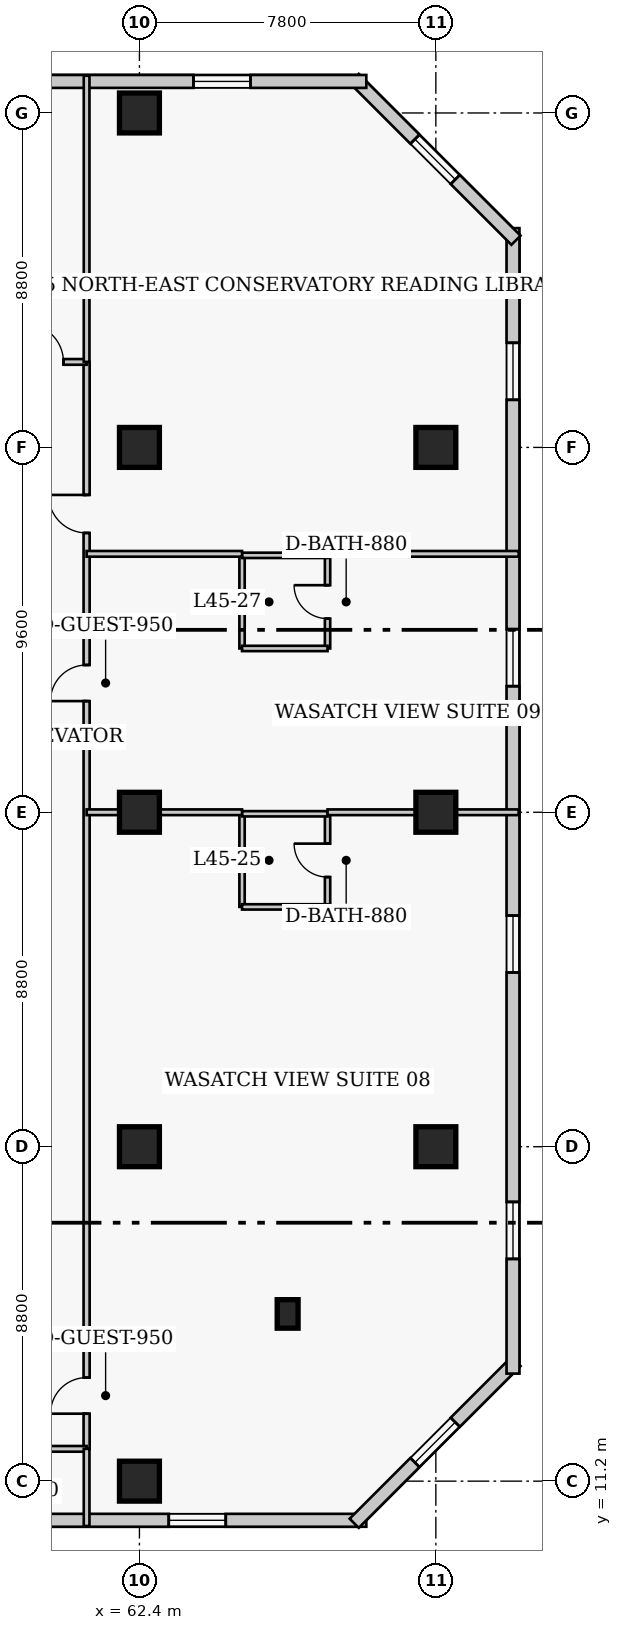
"""IFC4 building model, lengths in metres.
Left out: names, types, materials, properties, quantities, classifications, styles, units other than length and angle.
Written with IfcOpenShell. Run it as: python <this file> out.ifc"""

import sys

from ifc_helpers import new_model, si_unit, direction, frame, frame_2d, origin, origin_2d, place, context, subcontext, project, spatial, rectangle, extrude, element, fill, save


model = new_model("IFC4")
c1 = context("Model", 3, precision=1e-05, world=origin(), true_north=direction((0.0, 1.0)))
c2 = subcontext(c1, "Body", "Model", "MODEL_VIEW")
j1 = project(units=[si_unit("LENGTHUNIT", "METRE"), si_unit("PLANEANGLEUNIT", "RADIAN")], contexts=[c1])
p1 = place(None, origin())
s1 = spatial("IfcSite", under=j1, at=p1, CompositionType="ELEMENT")
p2 = place(p1, origin())
s2 = spatial("IfcBuilding", under=s1, at=p2, CompositionType="ELEMENT")
p3 = place(p2, frame((0.0, 0.0, 180.2)))
s3 = spatial("IfcBuildingStorey", under=s2, at=p3, CompositionType="ELEMENT", Elevation=180.2)
for number, where, z_axis, x_axis in (
    (1, (62.4, 11.2, 0.0), (0.0, 0.0, 1.0), (1.0, 0.0, 0.0)),
    (2, (62.4, 20.0, 0.0), (0.0, 0.0, 1.0), (1.0, 0.0, 0.0)),
    (3, (62.4, 28.8, 0.0), (0.0, 0.0, 1.0), (1.0, 0.0, 0.0)),
    (4, (62.4, 38.4, 0.0), (0.0, 0.0, 1.0), (1.0, 0.0, 0.0)),
    (5, (62.4, 47.2, 0.0), (0.0, 0.0, 1.0), (1.0, 0.0, 0.0)),
    (6, (70.2, 20.0, 0.0), (0.0, 0.0, 1.0), (1.0, 0.0, 0.0)),
    (7, (70.2, 28.8, 0.0), (0.0, 0.0, 1.0), (1.0, 0.0, 0.0)),
    (8, (70.2, 38.4, 0.0), (0.0, 0.0, 1.0), (1.0, 0.0, 0.0)),
):
    element("IfcColumn", number, at=place(p3, frame(where, z_axis=z_axis, x_axis=x_axis)), inside=s3, PredefinedType="COLUMN", context=c2, shape_type="SweptSolid", body=[
        extrude(rectangle(XDim=1.05, YDim=1.05, at=origin_2d()), origin(), (0.0, 0.0, 1.0), 3.8),
    ])
p4 = place(p3, frame((66.3, 15.6, 0.0), z_axis=(0.0, 0.0, 1.0), x_axis=(1.0, 0.0, 0.0)))
e9 = element("IfcColumn", 9, at=p4, inside=s3, PredefinedType="PILASTER", context=c2, shape_type="SweptSolid", body=[
    extrude(rectangle(XDim=0.55, YDim=0.75, at=origin_2d()), origin(), (0.0, 0.0, 1.0), 3.8),
])
p5 = place(p3, frame((41.68, 10.17, 0.0), z_axis=(0.0, 0.0, 1.0), x_axis=(1.0, 0.0, 0.0)))
e10 = element("IfcWall", 10, at=p5, inside=s3, PredefinedType="SOLIDWALL", context=c2, shape_type="SweptSolid", body=[
    extrude(rectangle(XDim=26.69, YDim=0.34, at=frame_2d((13.345, 0.0))), origin(), (0.0, 0.0, 1.0), 3.42),
])
p6 = place(p5, frame((2.548, 0.0, 0.85)))
e11 = element("IfcOpeningElement", 11, at=p6, cuts=e10, PredefinedType="OPENING", context=c2, shape_type="SweptSolid", body=[
    extrude(rectangle(XDim=1.5, YDim=1.75, at=frame_2d((0.75, 0.875))), frame((0.0, 0.18, 0.0), z_axis=(0.0, -1.0, 0.0), x_axis=(1.0, 0.0, 0.0)), (0.0, 0.0, 1.0), 0.36),
])
p7 = place(p5, frame((13.745, 0.0, 0.85)))
e12 = element("IfcOpeningElement", 12, at=p7, cuts=e10, PredefinedType="OPENING", context=c2, shape_type="SweptSolid", body=[
    extrude(rectangle(XDim=1.5, YDim=1.75, at=frame_2d((0.75, 0.875))), frame((0.0, 0.18, 0.0), z_axis=(0.0, -1.0, 0.0), x_axis=(1.0, 0.0, 0.0)), (0.0, 0.0, 1.0), 0.36),
])
p8 = place(p5, frame((21.492, 0.0, 0.85)))
e13 = element("IfcOpeningElement", 13, at=p8, cuts=e10, PredefinedType="OPENING", context=c2, shape_type="SweptSolid", body=[
    extrude(rectangle(XDim=1.5, YDim=1.75, at=frame_2d((0.75, 0.875))), frame((0.0, 0.18, 0.0), z_axis=(0.0, -1.0, 0.0), x_axis=(1.0, 0.0, 0.0)), (0.0, 0.0, 1.0), 0.36),
])
p9 = place(p5, frame((6.749, 0.0, 0.85)))
e14 = element("IfcOpeningElement", 14, at=p9, cuts=e10, PredefinedType="OPENING", context=c2, shape_type="SweptSolid", body=[
    extrude(rectangle(XDim=1.3, YDim=1.7, at=frame_2d((0.65, 0.85))), frame((0.0, 0.18, 0.0), z_axis=(0.0, -1.0, 0.0), x_axis=(1.0, 0.0, 0.0)), (0.0, 0.0, 1.0), 0.36),
])
p10 = place(p3, frame((68.052, 10.092, 0.0), z_axis=(0.0, 0.0, 1.0), x_axis=(0.707106781187, 0.707106781187, 0.0)))
e15 = element("IfcWall", 15, at=p10, inside=s3, PredefinedType="SOLIDWALL", context=c2, shape_type="SweptSolid", body=[
    extrude(rectangle(XDim=6.02, YDim=0.34, at=frame_2d((3.01, 0.0))), origin(), (0.0, 0.0, 1.0), 3.42),
])
p11 = place(p10, frame((2.26, 0.0, 0.85)))
e16 = element("IfcOpeningElement", 16, at=p11, cuts=e15, PredefinedType="OPENING", context=c2, shape_type="SweptSolid", body=[
    extrude(rectangle(XDim=1.5, YDim=1.75, at=frame_2d((0.75, 0.875))), frame((0.0, 0.18, 0.0), z_axis=(0.0, -1.0, 0.0), x_axis=(1.0, 0.0, 0.0)), (0.0, 0.0, 1.0), 0.36),
])
p12 = place(p3, frame((72.23, 14.03, 0.0), z_axis=(0.0, 0.0, 1.0), x_axis=(0.0, 1.0, 0.0)))
e17 = element("IfcWall", 17, at=p12, inside=s3, PredefinedType="SOLIDWALL", context=c2, shape_type="SweptSolid", body=[
    extrude(rectangle(XDim=30.14, YDim=0.34, at=frame_2d((15.07, 0.0))), origin(), (0.0, 0.0, 1.0), 3.42),
])
p13 = place(p12, frame((3.018, 0.0, 0.85)))
e18 = element("IfcOpeningElement", 18, at=p13, cuts=e17, PredefinedType="OPENING", context=c2, shape_type="SweptSolid", body=[
    extrude(rectangle(XDim=1.5, YDim=1.75, at=frame_2d((0.75, 0.875))), frame((0.0, 0.18, 0.0), z_axis=(0.0, -1.0, 0.0), x_axis=(1.0, 0.0, 0.0)), (0.0, 0.0, 1.0), 0.36),
])
p14 = place(p12, frame((10.552, 0.0, 0.85)))
e19 = element("IfcOpeningElement", 19, at=p14, cuts=e17, PredefinedType="OPENING", context=c2, shape_type="SweptSolid", body=[
    extrude(rectangle(XDim=1.5, YDim=1.75, at=frame_2d((0.75, 0.875))), frame((0.0, 0.18, 0.0), z_axis=(0.0, -1.0, 0.0), x_axis=(1.0, 0.0, 0.0)), (0.0, 0.0, 1.0), 0.36),
])
p15 = place(p12, frame((18.087, 0.0, 0.85)))
e20 = element("IfcOpeningElement", 20, at=p15, cuts=e17, PredefinedType="OPENING", context=c2, shape_type="SweptSolid", body=[
    extrude(rectangle(XDim=1.5, YDim=1.75, at=frame_2d((0.75, 0.875))), frame((0.0, 0.18, 0.0), z_axis=(0.0, -1.0, 0.0), x_axis=(1.0, 0.0, 0.0)), (0.0, 0.0, 1.0), 0.36),
])
p16 = place(p12, frame((25.623, 0.0, 0.85)))
e21 = element("IfcOpeningElement", 21, at=p16, cuts=e17, PredefinedType="OPENING", context=c2, shape_type="SweptSolid", body=[
    extrude(rectangle(XDim=1.5, YDim=1.75, at=frame_2d((0.75, 0.875))), frame((0.0, 0.18, 0.0), z_axis=(0.0, -1.0, 0.0), x_axis=(1.0, 0.0, 0.0)), (0.0, 0.0, 1.0), 0.36),
])
p17 = place(p3, frame((72.308, 43.852, 0.0), z_axis=(0.0, 0.0, 1.0), x_axis=(-0.707106781187, 0.707106781187, 0.0)))
e22 = element("IfcWall", 22, at=p17, inside=s3, PredefinedType="SOLIDWALL", context=c2, shape_type="SweptSolid", body=[
    extrude(rectangle(XDim=6.02, YDim=0.34, at=frame_2d((3.01, 0.0))), origin(), (0.0, 0.0, 1.0), 3.42),
])
p18 = place(p17, frame((2.26, 0.0, 0.85)))
e23 = element("IfcOpeningElement", 23, at=p18, cuts=e22, PredefinedType="OPENING", context=c2, shape_type="SweptSolid", body=[
    extrude(rectangle(XDim=1.5, YDim=1.75, at=frame_2d((0.75, 0.875))), frame((0.0, 0.18, 0.0), z_axis=(0.0, -1.0, 0.0), x_axis=(1.0, 0.0, 0.0)), (0.0, 0.0, 1.0), 0.36),
])
p19 = place(p3, frame((68.37, 48.03, 0.0), z_axis=(0.0, 0.0, 1.0), x_axis=(-1.0, 0.0, 0.0)))
e24 = element("IfcWall", 24, at=p19, inside=s3, PredefinedType="SOLIDWALL", context=c2, shape_type="SweptSolid", body=[
    extrude(rectangle(XDim=26.69, YDim=0.34, at=frame_2d((13.345, 0.0))), origin(), (0.0, 0.0, 1.0), 3.42),
])
p20 = place(p19, frame((3.048, 0.0, 0.85)))
e25 = element("IfcOpeningElement", 25, at=p20, cuts=e24, PredefinedType="OPENING", context=c2, shape_type="SweptSolid", body=[
    extrude(rectangle(XDim=1.5, YDim=1.75, at=frame_2d((0.75, 0.875))), frame((0.0, 0.18, 0.0), z_axis=(0.0, -1.0, 0.0), x_axis=(1.0, 0.0, 0.0)), (0.0, 0.0, 1.0), 0.36),
])
p21 = place(p19, frame((11.445, 0.0, 0.85)))
e26 = element("IfcOpeningElement", 26, at=p21, cuts=e24, PredefinedType="OPENING", context=c2, shape_type="SweptSolid", body=[
    extrude(rectangle(XDim=1.5, YDim=1.75, at=frame_2d((0.75, 0.875))), frame((0.0, 0.18, 0.0), z_axis=(0.0, -1.0, 0.0), x_axis=(1.0, 0.0, 0.0)), (0.0, 0.0, 1.0), 0.36),
])
p22 = place(p19, frame((22.642, 0.0, 0.85)))
e27 = element("IfcOpeningElement", 27, at=p22, cuts=e24, PredefinedType="OPENING", context=c2, shape_type="SweptSolid", body=[
    extrude(rectangle(XDim=1.5, YDim=1.75, at=frame_2d((0.75, 0.875))), frame((0.0, 0.18, 0.0), z_axis=(0.0, -1.0, 0.0), x_axis=(1.0, 0.0, 0.0)), (0.0, 0.0, 1.0), 0.36),
])
p23 = place(p3, frame((61.01, 12.05, 0.0), z_axis=(0.0, 0.0, 1.0), x_axis=(0.0, 1.0, 0.0)))
e28 = element("IfcWall", 28, at=p23, inside=s3, PredefinedType="PARTITIONING", context=c2, shape_type="SweptSolid", body=[
    extrude(rectangle(XDim=28.6, YDim=0.16, at=frame_2d((14.3, 0.0))), origin(), (0.0, 0.0, 1.0), 3.42),
])
p24 = place(p23, frame((0.925, 0.0, 0.0)))
e29 = element("IfcOpeningElement", 29, at=p24, cuts=e28, PredefinedType="OPENING", context=c2, shape_type="SweptSolid", body=[
    extrude(rectangle(XDim=0.95, YDim=2.1, at=frame_2d((0.475, 1.05))), frame((0.0, 0.09, 0.0), z_axis=(0.0, -1.0, 0.0), x_axis=(1.0, 0.0, 0.0)), (0.0, 0.0, 1.0), 0.18),
])
p25 = place(p23, frame((19.675, 0.0, 0.0)))
e30 = element("IfcOpeningElement", 30, at=p25, cuts=e28, PredefinedType="OPENING", context=c2, shape_type="SweptSolid", body=[
    extrude(rectangle(XDim=0.95, YDim=2.1, at=frame_2d((0.475, 1.05))), frame((0.0, 0.09, 0.0), z_axis=(0.0, -1.0, 0.0), x_axis=(1.0, 0.0, 0.0)), (0.0, 0.0, 1.0), 0.18),
])
p26 = place(p23, frame((24.1, 0.0, 0.0)))
e31 = element("IfcOpeningElement", 31, at=p26, cuts=e28, PredefinedType="OPENING", context=c2, shape_type="SweptSolid", body=[
    extrude(rectangle(XDim=1.0, YDim=2.15, at=frame_2d((0.5, 1.075))), frame((0.0, 0.09, 0.0), z_axis=(0.0, -1.0, 0.0), x_axis=(1.0, 0.0, 0.0)), (0.0, 0.0, 1.0), 0.18),
])
p27 = place(p3, frame((58.79, 12.05, 0.0), z_axis=(0.0, 0.0, 1.0), x_axis=(1.0, 0.0, 0.0)))
e32 = element("IfcWall", 32, at=p27, inside=s3, PredefinedType="PARTITIONING", context=c2, shape_type="SweptSolid", body=[
    extrude(rectangle(XDim=2.22, YDim=0.15, at=frame_2d((1.11, 0.0))), origin(), (0.0, 0.0, 1.0), 3.42),
])
p28 = place(p3, frame((56.8, 40.65, 0.0), z_axis=(0.0, 0.0, 1.0), x_axis=(1.0, 0.0, 0.0)))
e33 = element("IfcWall", 33, at=p28, inside=s3, PredefinedType="PARTITIONING", context=c2, shape_type="SweptSolid", body=[
    extrude(rectangle(XDim=4.21, YDim=0.15, at=frame_2d((2.105, 0.0))), origin(), (0.0, 0.0, 1.0), 3.42),
])
p29 = place(p28, frame((2.6, 0.0, 0.0)))
e34 = element("IfcOpeningElement", 34, at=p29, cuts=e33, PredefinedType="OPENING", context=c2, shape_type="SweptSolid", body=[
    extrude(rectangle(XDim=1.0, YDim=2.15, at=frame_2d((0.5, 1.075))), frame((0.0, 0.085, 0.0), z_axis=(0.0, -1.0, 0.0), x_axis=(1.0, 0.0, 0.0)), (0.0, 0.0, 1.0), 0.17),
])
p30 = place(p3, frame((61.01, 40.65, 0.0), z_axis=(0.0, 0.0, 1.0), x_axis=(0.0, 1.0, 0.0)))
e35 = element("IfcWall", 35, at=p30, inside=s3, PredefinedType="PARTITIONING", context=c2, shape_type="SweptSolid", body=[
    extrude(rectangle(XDim=7.53, YDim=0.15, at=frame_2d((3.765, 0.0))), origin(), (0.0, 0.0, 1.0), 3.42),
])
p31 = place(p3, frame((61.01, 10.02, 0.0), z_axis=(0.0, 0.0, 1.0), x_axis=(0.0, 1.0, 0.0)))
e36 = element("IfcWall", 36, at=p31, inside=s3, PredefinedType="PARTITIONING", context=c2, shape_type="SweptSolid", body=[
    extrude(rectangle(XDim=2.03, YDim=0.15, at=frame_2d((1.015, 0.0))), origin(), (0.0, 0.0, 1.0), 3.42),
])
p32 = place(p3, frame((65.1, 26.31, 0.0), z_axis=(0.0, 0.0, 1.0), x_axis=(0.0, 1.0, 0.0)))
e37 = element("IfcWall", 37, at=p32, inside=s3, PredefinedType="PLUMBINGWALL", context=c2, shape_type="SweptSolid", body=[
    extrude(rectangle(XDim=2.45, YDim=0.14, at=frame_2d((1.225, 0.0))), origin(), (0.0, 0.0, 1.0), 3.42),
])
p33 = place(p3, frame((67.35, 26.31, 0.0), z_axis=(0.0, 0.0, 1.0), x_axis=(0.0, 1.0, 0.0)))
e38 = element("IfcWall", 38, at=p33, inside=s3, PredefinedType="PLUMBINGWALL", context=c2, shape_type="SweptSolid", body=[
    extrude(rectangle(XDim=2.45, YDim=0.14, at=frame_2d((1.225, 0.0))), origin(), (0.0, 0.0, 1.0), 3.42),
])
p34 = place(p33, frame((0.785, 0.0, 0.0)))
e39 = element("IfcOpeningElement", 39, at=p34, cuts=e38, PredefinedType="OPENING", context=c2, shape_type="SweptSolid", body=[
    extrude(rectangle(XDim=0.88, YDim=2.05, at=frame_2d((0.44, 1.025))), frame((0.0, 0.08, 0.0), z_axis=(0.0, -1.0, 0.0), x_axis=(1.0, 0.0, 0.0)), (0.0, 0.0, 1.0), 0.16),
])
p35 = place(p3, frame((65.1, 26.31, 0.0), z_axis=(0.0, 0.0, 1.0), x_axis=(1.0, 0.0, 0.0)))
e40 = element("IfcWall", 40, at=p35, inside=s3, PredefinedType="PLUMBINGWALL", context=c2, shape_type="SweptSolid", body=[
    extrude(rectangle(XDim=2.25, YDim=0.14, at=frame_2d((1.125, 0.0))), origin(), (0.0, 0.0, 1.0), 3.42),
])
p36 = place(p3, frame((65.1, 28.76, 0.0), z_axis=(0.0, 0.0, 1.0), x_axis=(1.0, 0.0, 0.0)))
e41 = element("IfcWall", 41, at=p36, inside=s3, PredefinedType="PLUMBINGWALL", context=c2, shape_type="SweptSolid", body=[
    extrude(rectangle(XDim=2.25, YDim=0.14, at=frame_2d((1.125, 0.0))), origin(), (0.0, 0.0, 1.0), 2.77),
])
p37 = place(p3, frame((61.01, 28.8, 0.0), z_axis=(0.0, 0.0, 1.0), x_axis=(1.0, 0.0, 0.0)))
e42 = element("IfcWall", 42, at=p37, inside=s3, PredefinedType="PARTITIONING", context=c2, shape_type="SweptSolid", body=[
    extrude(rectangle(XDim=4.09, YDim=0.15, at=frame_2d((2.045, 0.0))), origin(), (0.0, 0.0, 1.0), 2.648),
])
p38 = place(p3, frame((67.35, 28.8, 0.0), z_axis=(0.0, 0.0, 1.0), x_axis=(1.0, 0.0, 0.0)))
e43 = element("IfcWall", 43, at=p38, inside=s3, PredefinedType="PARTITIONING", context=c2, shape_type="SweptSolid", body=[
    extrude(rectangle(XDim=5.03, YDim=0.15, at=frame_2d((2.515, 0.0))), origin(), (0.0, 0.0, 1.0), 2.648),
])
p39 = place(p3, frame((65.1, 33.11, 0.0), z_axis=(0.0, 0.0, 1.0), x_axis=(0.0, 1.0, 0.0)))
e44 = element("IfcWall", 44, at=p39, inside=s3, PredefinedType="PLUMBINGWALL", context=c2, shape_type="SweptSolid", body=[
    extrude(rectangle(XDim=2.45, YDim=0.14, at=frame_2d((1.225, 0.0))), origin(), (0.0, 0.0, 1.0), 3.42),
])
p40 = place(p3, frame((67.35, 33.11, 0.0), z_axis=(0.0, 0.0, 1.0), x_axis=(0.0, 1.0, 0.0)))
e45 = element("IfcWall", 45, at=p40, inside=s3, PredefinedType="PLUMBINGWALL", context=c2, shape_type="SweptSolid", body=[
    extrude(rectangle(XDim=2.45, YDim=0.14, at=frame_2d((1.225, 0.0))), origin(), (0.0, 0.0, 1.0), 3.42),
])
p41 = place(p40, frame((0.785, 0.0, 0.0)))
e46 = element("IfcOpeningElement", 46, at=p41, cuts=e45, PredefinedType="OPENING", context=c2, shape_type="SweptSolid", body=[
    extrude(rectangle(XDim=0.88, YDim=2.05, at=frame_2d((0.44, 1.025))), frame((0.0, 0.08, 0.0), z_axis=(0.0, -1.0, 0.0), x_axis=(1.0, 0.0, 0.0)), (0.0, 0.0, 1.0), 0.16),
])
for number, where, z_axis, x_axis in (
    (47, (65.1, 33.11, 0.0), (0.0, 0.0, 1.0), (1.0, 0.0, 0.0)),
    (48, (65.1, 35.56, 0.0), (0.0, 0.0, 1.0), (1.0, 0.0, 0.0)),
):
    element("IfcWall", number, at=place(p3, frame(where, z_axis=z_axis, x_axis=x_axis)), inside=s3, PredefinedType="PLUMBINGWALL", context=c2, shape_type="SweptSolid", body=[
        extrude(rectangle(XDim=2.25, YDim=0.14, at=frame_2d((1.125, 0.0))), origin(), (0.0, 0.0, 1.0), 3.42),
    ])
p42 = place(p3, frame((61.01, 35.6, 0.0), z_axis=(0.0, 0.0, 1.0), x_axis=(1.0, 0.0, 0.0)))
e49 = element("IfcWall", 49, at=p42, inside=s3, PredefinedType="PARTITIONING", context=c2, shape_type="SweptSolid", body=[
    extrude(rectangle(XDim=4.09, YDim=0.15, at=frame_2d((2.045, 0.0))), origin(), (0.0, 0.0, 1.0), 3.42),
])
p43 = place(p3, frame((67.35, 35.6, 0.0), z_axis=(0.0, 0.0, 1.0), x_axis=(1.0, 0.0, 0.0)))
e50 = element("IfcWall", 50, at=p43, inside=s3, PredefinedType="PARTITIONING", context=c2, shape_type="SweptSolid", body=[
    extrude(rectangle(XDim=5.03, YDim=0.15, at=frame_2d((2.515, 0.0))), origin(), (0.0, 0.0, 1.0), 3.42),
])
p44 = place(p8, origin())
e51 = element("IfcWindow", 51, at=p44, inside=s3, PartitioningType="SINGLE_PANEL", PredefinedType="WINDOW", context=c2, shape_type="SweptSolid", body=[
    extrude(rectangle(XDim=1.5, YDim=1.75, at=frame_2d((0.75, 0.875))), frame((0.0, 0.03, 0.0), z_axis=(0.0, -1.0, 0.0), x_axis=(1.0, 0.0, 0.0)), (0.0, 0.0, 1.0), 0.06),
])
fill(e13, e51)
p45 = place(p11, origin())
e52 = element("IfcWindow", 52, at=p45, inside=s3, PartitioningType="SINGLE_PANEL", PredefinedType="WINDOW", context=c2, shape_type="SweptSolid", body=[
    extrude(rectangle(XDim=1.5, YDim=1.75, at=frame_2d((0.75, 0.875))), frame((0.0, 0.03, 0.0), z_axis=(0.0, -1.0, 0.0), x_axis=(1.0, 0.0, 0.0)), (0.0, 0.0, 1.0), 0.06),
])
fill(e16, e52)
p46 = place(p13, origin())
e53 = element("IfcWindow", 53, at=p46, inside=s3, PartitioningType="SINGLE_PANEL", PredefinedType="WINDOW", context=c2, shape_type="SweptSolid", body=[
    extrude(rectangle(XDim=1.5, YDim=1.75, at=frame_2d((0.75, 0.875))), frame((0.0, 0.03, 0.0), z_axis=(0.0, -1.0, 0.0), x_axis=(1.0, 0.0, 0.0)), (0.0, 0.0, 1.0), 0.06),
])
fill(e18, e53)
p47 = place(p14, origin())
e54 = element("IfcWindow", 54, at=p47, inside=s3, PartitioningType="SINGLE_PANEL", PredefinedType="WINDOW", context=c2, shape_type="SweptSolid", body=[
    extrude(rectangle(XDim=1.5, YDim=1.75, at=frame_2d((0.75, 0.875))), frame((0.0, 0.03, 0.0), z_axis=(0.0, -1.0, 0.0), x_axis=(1.0, 0.0, 0.0)), (0.0, 0.0, 1.0), 0.06),
])
fill(e19, e54)
p48 = place(p15, origin())
e55 = element("IfcWindow", 55, at=p48, inside=s3, PartitioningType="SINGLE_PANEL", PredefinedType="WINDOW", context=c2, shape_type="SweptSolid", body=[
    extrude(rectangle(XDim=1.5, YDim=1.75, at=frame_2d((0.75, 0.875))), frame((0.0, 0.03, 0.0), z_axis=(0.0, -1.0, 0.0), x_axis=(1.0, 0.0, 0.0)), (0.0, 0.0, 1.0), 0.06),
])
fill(e20, e55)
p49 = place(p16, origin())
e56 = element("IfcWindow", 56, at=p49, inside=s3, PartitioningType="SINGLE_PANEL", PredefinedType="WINDOW", context=c2, shape_type="SweptSolid", body=[
    extrude(rectangle(XDim=1.5, YDim=1.75, at=frame_2d((0.75, 0.875))), frame((0.0, 0.03, 0.0), z_axis=(0.0, -1.0, 0.0), x_axis=(1.0, 0.0, 0.0)), (0.0, 0.0, 1.0), 0.06),
])
fill(e21, e56)
p50 = place(p18, origin())
e57 = element("IfcWindow", 57, at=p50, inside=s3, PartitioningType="SINGLE_PANEL", PredefinedType="WINDOW", context=c2, shape_type="SweptSolid", body=[
    extrude(rectangle(XDim=1.5, YDim=1.75, at=frame_2d((0.75, 0.875))), frame((0.0, 0.03, 0.0), z_axis=(0.0, -1.0, 0.0), x_axis=(1.0, 0.0, 0.0)), (0.0, 0.0, 1.0), 0.06),
])
fill(e23, e57)
p51 = place(p20, origin())
e58 = element("IfcWindow", 58, at=p51, inside=s3, PartitioningType="SINGLE_PANEL", PredefinedType="WINDOW", context=c2, shape_type="SweptSolid", body=[
    extrude(rectangle(XDim=1.5, YDim=1.75, at=frame_2d((0.75, 0.875))), frame((0.0, 0.03, 0.0), z_axis=(0.0, -1.0, 0.0), x_axis=(1.0, 0.0, 0.0)), (0.0, 0.0, 1.0), 0.06),
])
fill(e25, e58)
p52 = place(p29, origin())
e59 = element("IfcDoor", 59, at=p52, inside=s3, OperationType="SINGLE_SWING_LEFT", PredefinedType="DOOR", context=c2, shape_type="SweptSolid", body=[
    extrude(rectangle(XDim=1.0, YDim=2.15, at=frame_2d((0.5, 1.075))), frame((0.0, 0.025, 0.0), z_axis=(0.0, -1.0, 0.0), x_axis=(1.0, 0.0, 0.0)), (0.0, 0.0, 1.0), 0.05),
])
fill(e34, e59)
p53 = place(p34, origin())
e60 = element("IfcDoor", 60, at=p53, inside=s3, OperationType="SINGLE_SWING_RIGHT", PredefinedType="DOOR", context=c2, shape_type="SweptSolid", body=[
    extrude(rectangle(XDim=0.88, YDim=2.05, at=frame_2d((0.44, 1.025))), frame((0.0, 0.025, 0.0), z_axis=(0.0, -1.0, 0.0), x_axis=(1.0, 0.0, 0.0)), (0.0, 0.0, 1.0), 0.05),
])
fill(e39, e60)
p54 = place(p24, origin())
e61 = element("IfcDoor", 61, at=p54, inside=s3, OperationType="SINGLE_SWING_LEFT", PredefinedType="DOOR", context=c2, shape_type="SweptSolid", body=[
    extrude(rectangle(XDim=0.95, YDim=2.1, at=frame_2d((0.475, 1.05))), frame((0.0, 0.025, 0.0), z_axis=(0.0, -1.0, 0.0), x_axis=(1.0, 0.0, 0.0)), (0.0, 0.0, 1.0), 0.05),
])
fill(e29, e61)
p55 = place(p41, origin())
e62 = element("IfcDoor", 62, at=p55, inside=s3, OperationType="SINGLE_SWING_RIGHT", PredefinedType="DOOR", context=c2, shape_type="SweptSolid", body=[
    extrude(rectangle(XDim=0.88, YDim=2.05, at=frame_2d((0.44, 1.025))), frame((0.0, 0.025, 0.0), z_axis=(0.0, -1.0, 0.0), x_axis=(1.0, 0.0, 0.0)), (0.0, 0.0, 1.0), 0.05),
])
fill(e46, e62)
p56 = place(p25, origin())
e63 = element("IfcDoor", 63, at=p56, inside=s3, OperationType="SINGLE_SWING_LEFT", PredefinedType="DOOR", context=c2, shape_type="SweptSolid", body=[
    extrude(rectangle(XDim=0.95, YDim=2.1, at=frame_2d((0.475, 1.05))), frame((0.0, 0.025, 0.0), z_axis=(0.0, -1.0, 0.0), x_axis=(1.0, 0.0, 0.0)), (0.0, 0.0, 1.0), 0.05),
])
fill(e30, e63)
p57 = place(p26, origin())
e64 = element("IfcDoor", 64, at=p57, inside=s3, OperationType="SINGLE_SWING_RIGHT", PredefinedType="DOOR", context=c2, shape_type="SweptSolid", body=[
    extrude(rectangle(XDim=1.0, YDim=2.15, at=frame_2d((0.5, 1.075))), frame((0.0, 0.025, 0.0), z_axis=(0.0, -1.0, 0.0), x_axis=(1.0, 0.0, 0.0)), (0.0, 0.0, 1.0), 0.05),
])
fill(e31, e64)
save(model, sys.argv[1])
